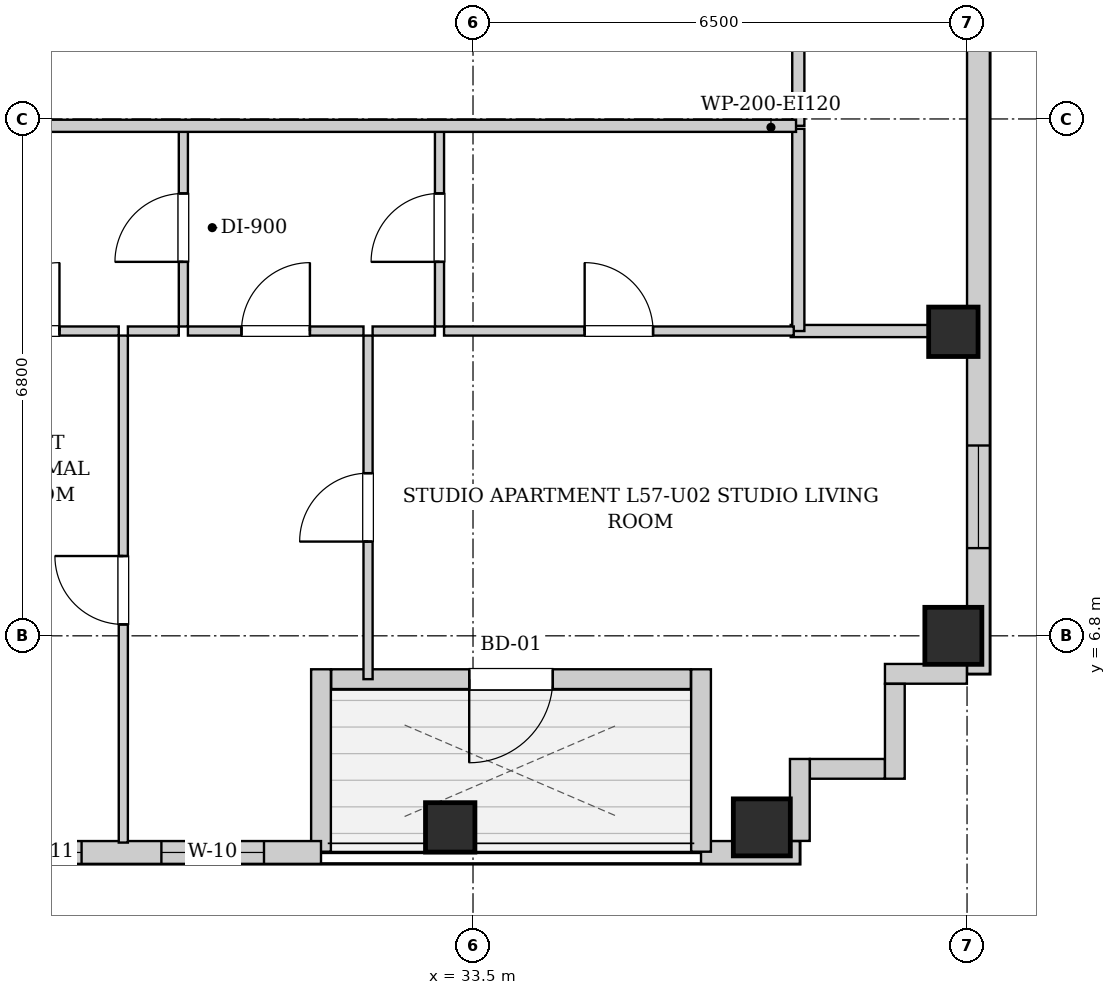
"""IFC4 building model, lengths in metres.
Left out: names, types, materials, properties, quantities, classifications, styles, units other than length and angle.
Written with IfcOpenShell. Run it as: python <this file> out.ifc"""

import sys

from ifc_helpers import new_model, si_unit, direction, frame, frame_2d, origin, origin_2d, place, context, subcontext, project, spatial, rectangle, extrude, element, fill, save


model = new_model("IFC4")
c1 = context("Model", 3, precision=1e-05, world=origin(), true_north=direction((0.0, 1.0)))
c2 = subcontext(c1, "Body", "Model", "MODEL_VIEW")
j1 = project(units=[si_unit("LENGTHUNIT", "METRE"), si_unit("PLANEANGLEUNIT", "RADIAN")], contexts=[c1])
p1 = place(None, origin())
s1 = spatial("IfcSite", under=j1, at=p1, CompositionType="ELEMENT")
p2 = place(p1, origin())
s2 = spatial("IfcBuilding", under=s1, at=p2, CompositionType="ELEMENT")
p3 = place(p2, frame((0.0, 0.0, 197.5)))
s3 = spatial("IfcBuildingStorey", under=s2, at=p3, CompositionType="ELEMENT", Elevation=197.5)
p4 = place(p3, frame((33.2, 4.28, 0.0), z_axis=(0.0, 0.0, 1.0), x_axis=(1.0, 0.0, 0.0)))
e1 = element("IfcColumn", 1, at=p4, inside=s3, PredefinedType="COLUMN", context=c2, shape_type="SweptSolid", body=[
    extrude(rectangle(XDim=0.65, YDim=0.65, at=origin_2d()), origin(), (0.0, 0.0, 1.0), 3.3),
])
for number, where, z_axis, x_axis in (
    (2, (37.3, 4.28, 0.0), (0.0, 0.0, 1.0), (1.0, 0.0, 0.0)),
    (3, (39.82, 6.8, 0.0), (0.0, 0.0, 1.0), (1.0, 0.0, 0.0)),
):
    element("IfcColumn", number, at=place(p3, frame(where, z_axis=z_axis, x_axis=x_axis)), inside=s3, PredefinedType="COLUMN", context=c2, shape_type="SweptSolid", body=[
        extrude(rectangle(XDim=0.75, YDim=0.75, at=origin_2d()), origin(), (0.0, 0.0, 1.0), 3.3),
    ])
p5 = place(p3, frame((39.82, 10.8, 0.0), z_axis=(0.0, 0.0, 1.0), x_axis=(1.0, 0.0, 0.0)))
e4 = element("IfcColumn", 4, at=p5, inside=s3, PredefinedType="COLUMN", context=c2, shape_type="SweptSolid", body=[
    extrude(rectangle(XDim=0.65, YDim=0.65, at=origin_2d()), origin(), (0.0, 0.0, 1.0), 3.3),
])
p6 = place(p3, frame((40.15, 37.7, 0.0), z_axis=(0.0, 0.0, 1.0), x_axis=(0.0, -1.0, 0.0)))
e5 = element("IfcWall", 5, at=p6, inside=s3, PredefinedType="SOLIDWALL", context=c2, shape_type="SweptSolid", body=[
    extrude(rectangle(XDim=31.4, YDim=0.3, at=frame_2d((15.7, 0.0))), origin(), (0.0, 0.0, 1.0), 3.04),
])
p7 = place(p6, frame((28.396, 0.0, 0.55)))
e6 = element("IfcOpeningElement", 6, at=p7, cuts=e5, PredefinedType="OPENING", context=c2, shape_type="SweptSolid", body=[
    extrude(rectangle(XDim=1.35, YDim=1.2, at=frame_2d((0.675, 0.6))), frame((0.0, 0.16, 0.0), z_axis=(0.0, -1.0, 0.0), x_axis=(1.0, 0.0, 0.0)), (0.0, 0.0, 1.0), 0.32),
])
p8 = place(p6, frame((1.653, 0.0, 0.55)))
e7 = element("IfcOpeningElement", 7, at=p8, cuts=e5, PredefinedType="OPENING", context=c2, shape_type="SweptSolid", body=[
    extrude(rectangle(XDim=1.35, YDim=1.2, at=frame_2d((0.675, 0.6))), frame((0.0, 0.16, 0.0), z_axis=(0.0, -1.0, 0.0), x_axis=(1.0, 0.0, 0.0)), (0.0, 0.0, 1.0), 0.32),
])
p9 = place(p6, frame((19.683, 0.0, 0.55)))
e8 = element("IfcOpeningElement", 8, at=p9, cuts=e5, PredefinedType="OPENING", context=c2, shape_type="SweptSolid", body=[
    extrude(rectangle(XDim=1.35, YDim=1.2, at=frame_2d((0.675, 0.6))), frame((0.0, 0.16, 0.0), z_axis=(0.0, -1.0, 0.0), x_axis=(1.0, 0.0, 0.0)), (0.0, 0.0, 1.0), 0.32),
])
p10 = place(p6, frame((10.367, 0.0, 0.55)))
e9 = element("IfcOpeningElement", 9, at=p10, cuts=e5, PredefinedType="OPENING", context=c2, shape_type="SweptSolid", body=[
    extrude(rectangle(XDim=1.35, YDim=1.2, at=frame_2d((0.675, 0.6))), frame((0.0, 0.16, 0.0), z_axis=(0.0, -1.0, 0.0), x_axis=(1.0, 0.0, 0.0)), (0.0, 0.0, 1.0), 0.32),
])
p11 = place(p3, frame((37.8, 3.95, 0.0), z_axis=(0.0, 0.0, 1.0), x_axis=(-1.0, 0.0, 0.0)))
e10 = element("IfcWall", 10, at=p11, inside=s3, PredefinedType="SOLIDWALL", context=c2, shape_type="SweptSolid", body=[
    extrude(rectangle(XDim=1.3, YDim=0.3, at=frame_2d((0.65, 0.0))), origin(), (0.0, 0.0, 1.0), 3.04),
])
p12 = place(p3, frame((36.5, 3.96, 0.0), z_axis=(0.0, 0.0, 1.0), x_axis=(0.0, 1.0, 0.0)))
e11 = element("IfcWall", 11, at=p12, inside=s3, PredefinedType="SOLIDWALL", context=c2, shape_type="SweptSolid", body=[
    extrude(rectangle(XDim=2.4, YDim=0.26, at=frame_2d((1.2, 0.0))), origin(), (0.0, 0.0, 1.0), 3.04),
])
p13 = place(p3, frame((36.366, 6.23, 0.0), z_axis=(0.0, 0.0, 1.0), x_axis=(-1.0, 0.0, 0.0)))
e12 = element("IfcWall", 12, at=p13, inside=s3, PredefinedType="SOLIDWALL", context=c2, shape_type="SweptSolid", body=[
    extrude(rectangle(XDim=4.732, YDim=0.26, at=frame_2d((2.366, 0.0))), origin(), (0.0, 0.0, 1.0), 3.04),
])
p14 = place(p13, frame((1.816, 0.0, 0.0)))
e13 = element("IfcOpeningElement", 13, at=p14, cuts=e12, PredefinedType="OPENING", context=c2, shape_type="SweptSolid", body=[
    extrude(rectangle(XDim=1.1, YDim=2.0, at=frame_2d((0.55, 1.0))), frame((0.0, 0.14, 0.0), z_axis=(0.0, -1.0, 0.0), x_axis=(1.0, 0.0, 0.0)), (0.0, 0.0, 1.0), 0.28),
])
p15 = place(p3, frame((31.5, 6.36, 0.0), z_axis=(0.0, 0.0, 1.0), x_axis=(0.0, -1.0, 0.0)))
e14 = element("IfcWall", 14, at=p15, inside=s3, PredefinedType="SOLIDWALL", context=c2, shape_type="SweptSolid", body=[
    extrude(rectangle(XDim=2.4, YDim=0.26, at=frame_2d((1.2, 0.0))), origin(), (0.0, 0.0, 1.0), 3.04),
])
p16 = place(p3, frame((31.5, 3.95, 0.0), z_axis=(0.0, 0.0, 1.0), x_axis=(-1.0, 0.0, 0.0)))
e15 = element("IfcWall", 15, at=p16, inside=s3, PredefinedType="SOLIDWALL", context=c2, shape_type="SweptSolid", body=[
    extrude(rectangle(XDim=11.4, YDim=0.3, at=frame_2d((5.7, 0.0))), origin(), (0.0, 0.0, 1.0), 3.04),
])
p17 = place(p16, frame((9.45, 0.0, 0.55)))
e16 = element("IfcOpeningElement", 16, at=p17, cuts=e15, PredefinedType="OPENING", context=c2, shape_type="SweptSolid", body=[
    extrude(rectangle(XDim=1.35, YDim=1.2, at=frame_2d((0.675, 0.6))), frame((0.0, 0.16, 0.0), z_axis=(0.0, -1.0, 0.0), x_axis=(1.0, 0.0, 0.0)), (0.0, 0.0, 1.0), 0.32),
])
p18 = place(p16, frame((3.15, 0.0, 0.55)))
e17 = element("IfcOpeningElement", 17, at=p18, cuts=e15, PredefinedType="OPENING", context=c2, shape_type="SweptSolid", body=[
    extrude(rectangle(XDim=0.85, YDim=1.2, at=frame_2d((0.425, 0.6))), frame((0.0, 0.16, 0.0), z_axis=(0.0, -1.0, 0.0), x_axis=(1.0, 0.0, 0.0)), (0.0, 0.0, 1.0), 0.32),
])
p19 = place(p16, frame((0.75, 0.0, 0.55)))
e18 = element("IfcOpeningElement", 18, at=p19, cuts=e15, PredefinedType="OPENING", context=c2, shape_type="SweptSolid", body=[
    extrude(rectangle(XDim=1.35, YDim=1.2, at=frame_2d((0.675, 0.6))), frame((0.0, 0.16, 0.0), z_axis=(0.0, -1.0, 0.0), x_axis=(1.0, 0.0, 0.0)), (0.0, 0.0, 1.0), 0.32),
])
p20 = place(p3, frame((39.998, 6.3, 0.0), z_axis=(0.0, 0.0, 1.0), x_axis=(-1.0, 0.0, 0.0)))
e19 = element("IfcWall", 19, at=p20, inside=s3, PredefinedType="SOLIDWALL", context=c2, shape_type="SweptSolid", body=[
    extrude(rectangle(XDim=1.078, YDim=0.26, at=frame_2d((0.539, 0.0))), origin(), (0.0, 0.0, 1.0), 3.04),
])
p21 = place(p3, frame((39.05, 6.168, 0.0), z_axis=(0.0, 0.0, 1.0), x_axis=(0.0, -1.0, 0.0)))
e20 = element("IfcWall", 20, at=p21, inside=s3, PredefinedType="SOLIDWALL", context=c2, shape_type="SweptSolid", body=[
    extrude(rectangle(XDim=1.248, YDim=0.26, at=frame_2d((0.624, 0.0))), origin(), (0.0, 0.0, 1.0), 3.04),
])
p22 = place(p3, frame((38.918, 5.05, 0.0), z_axis=(0.0, 0.0, 1.0), x_axis=(-1.0, 0.0, 0.0)))
e21 = element("IfcWall", 21, at=p22, inside=s3, PredefinedType="SOLIDWALL", context=c2, shape_type="SweptSolid", body=[
    extrude(rectangle(XDim=0.986, YDim=0.26, at=frame_2d((0.493, 0.0))), origin(), (0.0, 0.0, 1.0), 3.04),
])
p23 = place(p3, frame((37.8, 5.18, 0.0), z_axis=(0.0, 0.0, 1.0), x_axis=(0.0, -1.0, 0.0)))
e22 = element("IfcWall", 22, at=p23, inside=s3, PredefinedType="SOLIDWALL", context=c2, shape_type="SweptSolid", body=[
    extrude(rectangle(XDim=1.078, YDim=0.26, at=frame_2d((0.539, 0.0))), origin(), (0.0, 0.0, 1.0), 3.04),
])
p24 = place(p3, frame((37.78, 13.51, 0.0), z_axis=(0.0, 0.0, 1.0), x_axis=(0.0, 1.0, 0.0)))
e23 = element("IfcWall", 23, at=p24, inside=s3, PredefinedType="PARTITIONING", context=c2, shape_type="SweptSolid", body=[
    extrude(rectangle(XDim=1.58, YDim=0.16, at=frame_2d((0.79, 0.0))), origin(), (0.0, 0.0, 1.0), 3.04),
])
p25 = place(p3, frame((37.68, 10.81, 0.0), z_axis=(0.0, 0.0, 1.0), x_axis=(1.0, 0.0, 0.0)))
e24 = element("IfcWall", 24, at=p25, inside=s3, PredefinedType="PARTITIONING", context=c2, shape_type="SweptSolid", body=[
    extrude(rectangle(XDim=2.34, YDim=0.16, at=frame_2d((1.17, 0.0))), origin(), (0.0, 0.0, 1.0), 3.04),
])
p26 = place(p3, frame((37.78, 10.81, 0.0), z_axis=(0.0, 0.0, 1.0), x_axis=(0.0, 1.0, 0.0)))
e25 = element("IfcWall", 25, at=p26, inside=s3, PredefinedType="PARTITIONING", context=c2, shape_type="SweptSolid", body=[
    extrude(rectangle(XDim=2.66, YDim=0.16, at=frame_2d((1.33, 0.0))), origin(), (0.0, 0.0, 1.0), 3.04),
])
p27 = place(p3, frame((29.689, 10.87, 0.0), z_axis=(0.0, 0.0, 1.0), x_axis=(0.0, 1.0, 0.0)))
e26 = element("IfcWall", 26, at=p27, inside=s3, PredefinedType="PARTITIONING", context=c2, shape_type="SweptSolid", body=[
    extrude(rectangle(XDim=2.6, YDim=0.12, at=frame_2d((1.3, 0.0))), origin(), (0.0, 0.0, 1.0), 3.04),
])
p28 = place(p27, frame((0.85, 0.0, 0.0)))
e27 = element("IfcOpeningElement", 27, at=p28, cuts=e26, PredefinedType="OPENING", context=c2, shape_type="SweptSolid", body=[
    extrude(rectangle(XDim=0.9, YDim=2.05, at=frame_2d((0.45, 1.025))), frame((0.0, 0.07, 0.0), z_axis=(0.0, -1.0, 0.0), x_axis=(1.0, 0.0, 0.0)), (0.0, 0.0, 1.0), 0.14),
])
p29 = place(p3, frame((26.379, 10.81, 0.0), z_axis=(0.0, 0.0, 1.0), x_axis=(1.0, 0.0, 0.0)))
e28 = element("IfcWall", 28, at=p29, inside=s3, PredefinedType="PARTITIONING", context=c2, shape_type="SweptSolid", body=[
    extrude(rectangle(XDim=2.46, YDim=0.12, at=frame_2d((1.23, 0.0))), origin(), (0.0, 0.0, 1.0), 3.04),
])
p30 = place(p29, frame((0.78, 0.0, 0.0)))
e29 = element("IfcOpeningElement", 29, at=p30, cuts=e28, PredefinedType="OPENING", context=c2, shape_type="SweptSolid", body=[
    extrude(rectangle(XDim=0.9, YDim=2.05, at=frame_2d((0.45, 1.025))), frame((0.0, 0.07, 0.0), z_axis=(0.0, -1.0, 0.0), x_axis=(1.0, 0.0, 0.0)), (0.0, 0.0, 1.0), 0.14),
])
p31 = place(p3, frame((28.959, 10.81, 0.0), z_axis=(0.0, 0.0, 1.0), x_axis=(1.0, 0.0, 0.0)))
e30 = element("IfcWall", 30, at=p31, inside=s3, PredefinedType="PARTITIONING", context=c2, shape_type="SweptSolid", body=[
    extrude(rectangle(XDim=0.67, YDim=0.12, at=frame_2d((0.335, 0.0))), origin(), (0.0, 0.0, 1.0), 3.04),
])
p32 = place(p3, frame((33.059, 10.87, 0.0), z_axis=(0.0, 0.0, 1.0), x_axis=(0.0, 1.0, 0.0)))
e31 = element("IfcWall", 31, at=p32, inside=s3, PredefinedType="PARTITIONING", context=c2, shape_type="SweptSolid", body=[
    extrude(rectangle(XDim=2.6, YDim=0.12, at=frame_2d((1.3, 0.0))), origin(), (0.0, 0.0, 1.0), 3.04),
])
p33 = place(p32, frame((0.85, 0.0, 0.0)))
e32 = element("IfcOpeningElement", 32, at=p33, cuts=e31, PredefinedType="OPENING", context=c2, shape_type="SweptSolid", body=[
    extrude(rectangle(XDim=0.9, YDim=2.05, at=frame_2d((0.45, 1.025))), frame((0.0, 0.07, 0.0), z_axis=(0.0, -1.0, 0.0), x_axis=(1.0, 0.0, 0.0)), (0.0, 0.0, 1.0), 0.14),
])
p34 = place(p3, frame((29.749, 10.81, 0.0), z_axis=(0.0, 0.0, 1.0), x_axis=(1.0, 0.0, 0.0)))
e33 = element("IfcWall", 33, at=p34, inside=s3, PredefinedType="PARTITIONING", context=c2, shape_type="SweptSolid", body=[
    extrude(rectangle(XDim=2.31, YDim=0.12, at=frame_2d((1.155, 0.0))), origin(), (0.0, 0.0, 1.0), 3.04),
])
p35 = place(p34, frame((0.705, 0.0, 0.0)))
e34 = element("IfcOpeningElement", 34, at=p35, cuts=e33, PredefinedType="OPENING", context=c2, shape_type="SweptSolid", body=[
    extrude(rectangle(XDim=0.9, YDim=2.05, at=frame_2d((0.45, 1.025))), frame((0.0, 0.07, 0.0), z_axis=(0.0, -1.0, 0.0), x_axis=(1.0, 0.0, 0.0)), (0.0, 0.0, 1.0), 0.14),
])
p36 = place(p3, frame((32.179, 10.81, 0.0), z_axis=(0.0, 0.0, 1.0), x_axis=(1.0, 0.0, 0.0)))
e35 = element("IfcWall", 35, at=p36, inside=s3, PredefinedType="PARTITIONING", context=c2, shape_type="SweptSolid", body=[
    extrude(rectangle(XDim=0.82, YDim=0.12, at=frame_2d((0.41, 0.0))), origin(), (0.0, 0.0, 1.0), 3.04),
])
p37 = place(p3, frame((33.119, 10.81, 0.0), z_axis=(0.0, 0.0, 1.0), x_axis=(1.0, 0.0, 0.0)))
e36 = element("IfcWall", 36, at=p37, inside=s3, PredefinedType="PARTITIONING", context=c2, shape_type="SweptSolid", body=[
    extrude(rectangle(XDim=4.601, YDim=0.12, at=frame_2d((2.301, 0.0))), origin(), (0.0, 0.0, 1.0), 3.04),
])
p38 = place(p37, frame((1.85, 0.0, 0.0)))
e37 = element("IfcOpeningElement", 37, at=p38, cuts=e36, PredefinedType="OPENING", context=c2, shape_type="SweptSolid", body=[
    extrude(rectangle(XDim=0.9, YDim=2.05, at=frame_2d((0.45, 1.025))), frame((0.0, 0.07, 0.0), z_axis=(0.0, -1.0, 0.0), x_axis=(1.0, 0.0, 0.0)), (0.0, 0.0, 1.0), 0.14),
])
p39 = place(p3, frame((28.899, 4.08, 0.0), z_axis=(0.0, 0.0, 1.0), x_axis=(0.0, 1.0, 0.0)))
e38 = element("IfcWall", 38, at=p39, inside=s3, PredefinedType="PARTITIONING", context=c2, shape_type="SweptSolid", body=[
    extrude(rectangle(XDim=6.67, YDim=0.12, at=frame_2d((3.335, 0.0))), origin(), (0.0, 0.0, 1.0), 3.04),
])
p40 = place(p39, frame((2.87, 0.0, 0.0)))
e39 = element("IfcOpeningElement", 39, at=p40, cuts=e38, PredefinedType="OPENING", context=c2, shape_type="SweptSolid", body=[
    extrude(rectangle(XDim=0.9, YDim=2.05, at=frame_2d((0.45, 1.025))), frame((0.0, 0.07, 0.0), z_axis=(0.0, -1.0, 0.0), x_axis=(1.0, 0.0, 0.0)), (0.0, 0.0, 1.0), 0.14),
])
p41 = place(p3, frame((32.119, 6.23, 0.0), z_axis=(0.0, 0.0, 1.0), x_axis=(0.0, 1.0, 0.0)))
e40 = element("IfcWall", 40, at=p41, inside=s3, PredefinedType="PARTITIONING", context=c2, shape_type="SweptSolid", body=[
    extrude(rectangle(XDim=4.52, YDim=0.12, at=frame_2d((2.26, 0.0))), origin(), (0.0, 0.0, 1.0), 3.04),
])
p42 = place(p41, frame((1.81, 0.0, 0.0)))
e41 = element("IfcOpeningElement", 41, at=p42, cuts=e40, PredefinedType="OPENING", context=c2, shape_type="SweptSolid", body=[
    extrude(rectangle(XDim=0.9, YDim=2.05, at=frame_2d((0.45, 1.025))), frame((0.0, 0.07, 0.0), z_axis=(0.0, -1.0, 0.0), x_axis=(1.0, 0.0, 0.0)), (0.0, 0.0, 1.0), 0.14),
])
p43 = place(p3, frame((13.15, 13.51, 0.0), z_axis=(0.0, 0.0, 1.0), x_axis=(1.0, 0.0, 0.0)))
e42 = element("IfcWall", 42, at=p43, inside=s3, PredefinedType="PARTITIONING", context=c2, shape_type="SweptSolid", body=[
    extrude(rectangle(XDim=24.6, YDim=0.16, at=frame_2d((12.3, 0.0))), origin(), (0.0, 0.0, 1.0), 3.04),
])
p44 = place(p43, frame((3.115, 0.0, 0.0)))
e43 = element("IfcOpeningElement", 43, at=p44, cuts=e42, PredefinedType="OPENING", context=c2, shape_type="SweptSolid", body=[
    extrude(rectangle(XDim=0.95, YDim=2.1, at=frame_2d((0.475, 1.05))), frame((0.0, 0.09, 0.0), z_axis=(0.0, -1.0, 0.0), x_axis=(1.0, 0.0, 0.0)), (0.0, 0.0, 1.0), 0.18),
])
p45 = place(p43, frame((10.414, 0.0, 0.0)))
e44 = element("IfcOpeningElement", 44, at=p45, cuts=e42, PredefinedType="OPENING", context=c2, shape_type="SweptSolid", body=[
    extrude(rectangle(XDim=0.95, YDim=2.1, at=frame_2d((0.475, 1.05))), frame((0.0, 0.09, 0.0), z_axis=(0.0, -1.0, 0.0), x_axis=(1.0, 0.0, 0.0)), (0.0, 0.0, 1.0), 0.18),
])
p46 = place(p28, origin())
e45 = element("IfcDoor", 45, at=p46, inside=s3, OperationType="SINGLE_SWING_LEFT", PredefinedType="DOOR", context=c2, shape_type="SweptSolid", body=[
    extrude(rectangle(XDim=0.9, YDim=2.05, at=frame_2d((0.45, 1.025))), frame((0.0, 0.025, 0.0), z_axis=(0.0, -1.0, 0.0), x_axis=(1.0, 0.0, 0.0)), (0.0, 0.0, 1.0), 0.05),
])
fill(e27, e45)
p47 = place(p30, origin())
e46 = element("IfcDoor", 46, at=p47, inside=s3, OperationType="SINGLE_SWING_RIGHT", PredefinedType="DOOR", context=c2, shape_type="SweptSolid", body=[
    extrude(rectangle(XDim=0.9, YDim=2.05, at=frame_2d((0.45, 1.025))), frame((0.0, 0.025, 0.0), z_axis=(0.0, -1.0, 0.0), x_axis=(1.0, 0.0, 0.0)), (0.0, 0.0, 1.0), 0.05),
])
fill(e29, e46)
p48 = place(p33, origin())
e47 = element("IfcDoor", 47, at=p48, inside=s3, OperationType="SINGLE_SWING_LEFT", PredefinedType="DOOR", context=c2, shape_type="SweptSolid", body=[
    extrude(rectangle(XDim=0.9, YDim=2.05, at=frame_2d((0.45, 1.025))), frame((0.0, 0.025, 0.0), z_axis=(0.0, -1.0, 0.0), x_axis=(1.0, 0.0, 0.0)), (0.0, 0.0, 1.0), 0.05),
])
fill(e32, e47)
p49 = place(p35, origin())
e48 = element("IfcDoor", 48, at=p49, inside=s3, OperationType="SINGLE_SWING_RIGHT", PredefinedType="DOOR", context=c2, shape_type="SweptSolid", body=[
    extrude(rectangle(XDim=0.9, YDim=2.05, at=frame_2d((0.45, 1.025))), frame((0.0, 0.025, 0.0), z_axis=(0.0, -1.0, 0.0), x_axis=(1.0, 0.0, 0.0)), (0.0, 0.0, 1.0), 0.05),
])
fill(e34, e48)
p50 = place(p38, origin())
e49 = element("IfcDoor", 49, at=p50, inside=s3, OperationType="SINGLE_SWING_LEFT", PredefinedType="DOOR", context=c2, shape_type="SweptSolid", body=[
    extrude(rectangle(XDim=0.9, YDim=2.05, at=frame_2d((0.45, 1.025))), frame((0.0, 0.025, 0.0), z_axis=(0.0, -1.0, 0.0), x_axis=(1.0, 0.0, 0.0)), (0.0, 0.0, 1.0), 0.05),
])
fill(e37, e49)
p51 = place(p40, origin())
e50 = element("IfcDoor", 50, at=p51, inside=s3, OperationType="SINGLE_SWING_RIGHT", PredefinedType="DOOR", context=c2, shape_type="SweptSolid", body=[
    extrude(rectangle(XDim=0.9, YDim=2.05, at=frame_2d((0.45, 1.025))), frame((0.0, 0.025, 0.0), z_axis=(0.0, -1.0, 0.0), x_axis=(1.0, 0.0, 0.0)), (0.0, 0.0, 1.0), 0.05),
])
fill(e39, e50)
p52 = place(p42, origin())
e51 = element("IfcDoor", 51, at=p52, inside=s3, OperationType="SINGLE_SWING_LEFT", PredefinedType="DOOR", context=c2, shape_type="SweptSolid", body=[
    extrude(rectangle(XDim=0.9, YDim=2.05, at=frame_2d((0.45, 1.025))), frame((0.0, 0.025, 0.0), z_axis=(0.0, -1.0, 0.0), x_axis=(1.0, 0.0, 0.0)), (0.0, 0.0, 1.0), 0.05),
])
fill(e41, e51)
p53 = place(p14, origin())
e52 = element("IfcDoor", 52, at=p53, inside=s3, OperationType="SINGLE_SWING_RIGHT", PredefinedType="DOOR", context=c2, shape_type="SweptSolid", body=[
    extrude(rectangle(XDim=1.1, YDim=2.0, at=frame_2d((0.55, 1.0))), frame((0.0, 0.025, 0.0), z_axis=(0.0, -1.0, 0.0), x_axis=(1.0, 0.0, 0.0)), (0.0, 0.0, 1.0), 0.05),
])
fill(e13, e52)
p54 = place(p18, origin())
e53 = element("IfcWindow", 53, at=p54, inside=s3, PartitioningType="SINGLE_PANEL", PredefinedType="WINDOW", context=c2, shape_type="SweptSolid", body=[
    extrude(rectangle(XDim=0.85, YDim=1.2, at=frame_2d((0.425, 0.6))), frame((0.0, 0.03, 0.0), z_axis=(0.0, -1.0, 0.0), x_axis=(1.0, 0.0, 0.0)), (0.0, 0.0, 1.0), 0.06),
])
fill(e17, e53)
p55 = place(p19, origin())
e54 = element("IfcWindow", 54, at=p55, inside=s3, PartitioningType="SINGLE_PANEL", PredefinedType="WINDOW", context=c2, shape_type="SweptSolid", body=[
    extrude(rectangle(XDim=1.35, YDim=1.2, at=frame_2d((0.675, 0.6))), frame((0.0, 0.03, 0.0), z_axis=(0.0, -1.0, 0.0), x_axis=(1.0, 0.0, 0.0)), (0.0, 0.0, 1.0), 0.06),
])
fill(e18, e54)
p56 = place(p7, origin())
e55 = element("IfcWindow", 55, at=p56, inside=s3, PartitioningType="SINGLE_PANEL", PredefinedType="WINDOW", context=c2, shape_type="SweptSolid", body=[
    extrude(rectangle(XDim=1.35, YDim=1.2, at=frame_2d((0.675, 0.6))), frame((0.0, 0.03, 0.0), z_axis=(0.0, -1.0, 0.0), x_axis=(1.0, 0.0, 0.0)), (0.0, 0.0, 1.0), 0.06),
])
fill(e6, e55)
save(model, sys.argv[1])
